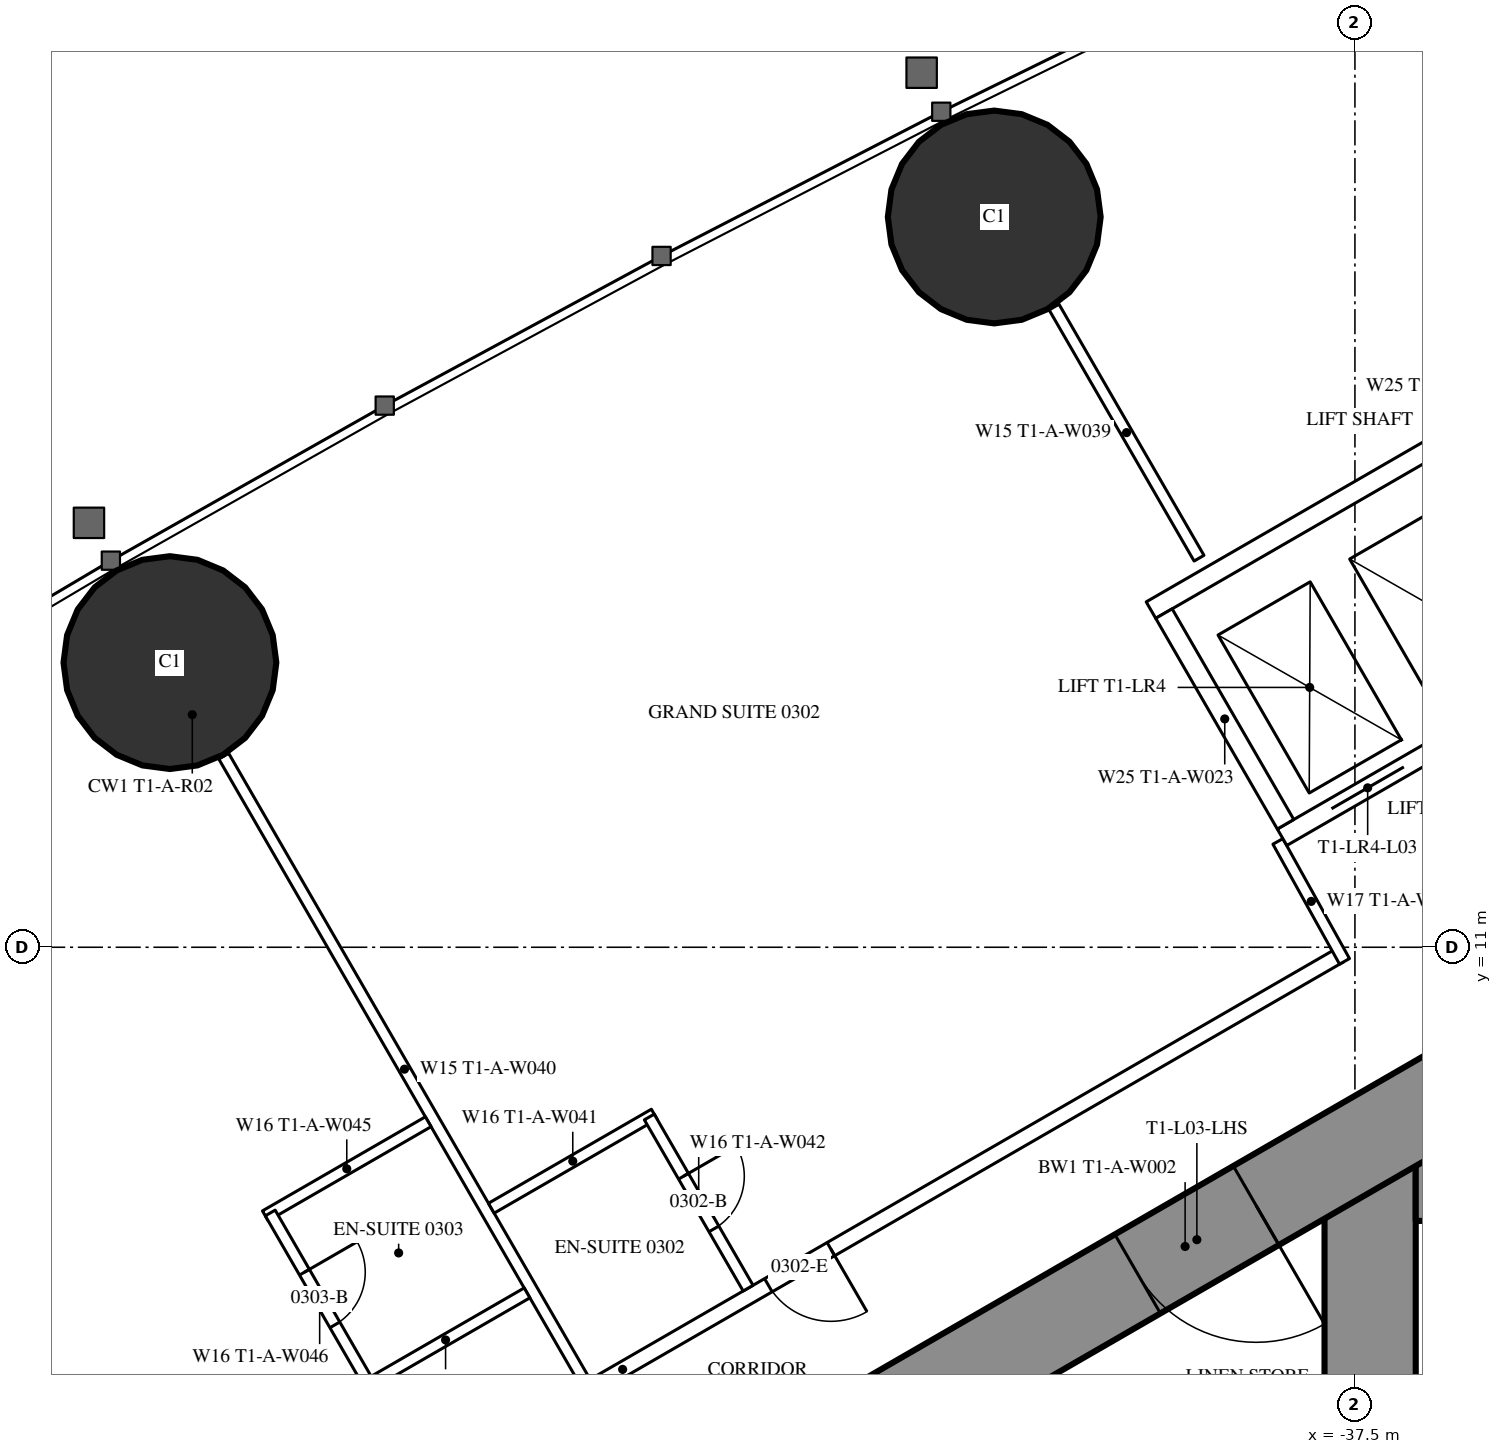
"""IFC4 building model, lengths in metres.
Left out: names, types, materials, properties, quantities, classifications, styles, units other than length and angle.
Written with IfcOpenShell. Run it as: python <this file> out.ifc"""

import sys

from ifc_helpers import new_model, si_unit, direction, frame, frame_2d, origin, origin_2d, place, context, subcontext, project, spatial, rectangle, hollow_circle, extrude, element, fill, save


model = new_model("IFC4")
c1 = context("Model", 3, precision=1e-05, world=origin(), true_north=direction((0.0, 1.0)))
c2 = subcontext(c1, "Body", "Model", "MODEL_VIEW")
j1 = project(units=[si_unit("LENGTHUNIT", "METRE"), si_unit("PLANEANGLEUNIT", "RADIAN")], contexts=[c1])
p1 = place(None, origin())
s1 = spatial("IfcSite", under=j1, at=p1, CompositionType="ELEMENT")
p2 = place(p1, origin())
s2 = spatial("IfcBuilding", under=s1, at=p2, CompositionType="ELEMENT")
p3 = place(p2, frame((0.0, 0.0, 18.0)))
s3 = spatial("IfcBuildingStorey", under=s2, at=p3, CompositionType="ELEMENT", Elevation=18.0)
for number, where, z_axis, x_axis in (
    (1, (-42.245, 20.607, 0.0), (0.0, 0.0, 1.0), (1.0, 0.0, 0.0)),
    (2, (-53.09, 14.745, 0.0), (0.0, 0.0, 1.0), (1.0, 0.0, 0.0)),
):
    element("IfcColumn", number, at=place(p3, frame(where, z_axis=z_axis, x_axis=x_axis)), inside=s3, PredefinedType="COLUMN", context=c2, shape_type="SweptSolid", body=[
        extrude(hollow_circle(Radius=1.4, WallThickness=0.12, at=origin_2d()), origin(), (0.0, 0.0, 1.0), 3.5),
    ])
p4 = place(p3, frame((-37.3, 8.6, 0.0), z_axis=(0.0, 0.0, 1.0), x_axis=(0.0, -1.0, 0.0)))
e3 = element("IfcWall", 3, at=p4, inside=s3, PredefinedType="SHEAR", context=c2, shape_type="SweptSolid", body=[
    extrude(rectangle(XDim=17.2, YDim=1.2, at=frame_2d((8.6, 0.0))), origin(), (0.0, 0.0, 1.0), 3.5),
])
p5 = place(p4, frame((7.7, 0.0, 0.0)))
e4 = element("IfcOpeningElement", 4, at=p5, cuts=e3, PredefinedType="OPENING", context=c2, shape_type="SweptSolid", body=[
    extrude(rectangle(XDim=1.8, YDim=2.2, at=frame_2d((0.9, 1.1))), frame((0.0, 0.61, 0.0), z_axis=(0.0, -1.0, 0.0), x_axis=(1.0, 0.0, 0.0)), (0.0, 0.0, 1.0), 1.22),
])
p6 = place(p3, frame((-28.3, 8.0, 0.0), z_axis=(0.0, 0.0, 1.0), x_axis=(-1.0, 0.0, 0.0)))
e5 = element("IfcWall", 5, at=p6, inside=s3, PredefinedType="SHEAR", context=c2, shape_type="SweptSolid", body=[
    extrude(rectangle(XDim=8.4, YDim=1.2, at=frame_2d((4.2, 0.0))), origin(), (0.0, 0.0, 1.0), 3.5),
])
p7 = place(p6, frame((0.25, 0.0, 0.0)))
e6 = element("IfcOpeningElement", 6, at=p7, cuts=e5, PredefinedType="OPENING", context=c2, shape_type="SweptSolid", body=[
    extrude(rectangle(XDim=1.0, YDim=2.2, at=frame_2d((0.5, 1.1))), frame((0.0, 0.61, 0.0), z_axis=(0.0, -1.0, 0.0), x_axis=(1.0, 0.0, 0.0)), (0.0, 0.0, 1.0), 1.22),
])
p8 = place(p3, frame((-27.2, 14.3, 0.0), z_axis=(0.0, 0.0, 1.0), x_axis=(-0.866026593062, -0.499997940104, 0.0)))
e7 = element("IfcWall", 7, at=p8, inside=s3, PredefinedType="SHEAR", context=c2, shape_type="SweptSolid", body=[
    extrude(rectangle(XDim=28.946, YDim=1.2, at=frame_2d((14.473, 0.0))), origin(), (0.0, 0.0, 1.0), 3.5),
])
p9 = place(p8, frame((4.6, 0.0, 0.0)))
e8 = element("IfcOpeningElement", 8, at=p9, cuts=e7, PredefinedType="OPENING", context=c2, shape_type="SweptSolid", body=[
    extrude(rectangle(XDim=1.0, YDim=2.2, at=frame_2d((0.5, 1.1))), frame((0.0, 0.61, 0.0), z_axis=(0.0, -1.0, 0.0), x_axis=(1.0, 0.0, 0.0)), (0.0, 0.0, 1.0), 1.22),
])
p10 = place(p8, frame((13.395, 0.0, 0.0)))
e9 = element("IfcOpeningElement", 9, at=p10, cuts=e7, PredefinedType="OPENING", context=c2, shape_type="SweptSolid", body=[
    extrude(rectangle(XDim=1.8, YDim=2.2, at=frame_2d((0.9, 1.1))), frame((0.0, 0.61, 0.0), z_axis=(0.0, -1.0, 0.0), x_axis=(1.0, 0.0, 0.0)), (0.0, 0.0, 1.0), 1.22),
])
p11 = place(p3, frame((-47.627, 5.278, 0.0), z_axis=(0.0, 0.0, 1.0), x_axis=(-0.500009844318, 0.86601972009, 0.0)))
e10 = element("IfcWall", 10, at=p11, inside=s3, PredefinedType="PARTITIONING", context=c2, shape_type="SweptSolid", body=[
    extrude(rectangle(XDim=9.51, YDim=0.15, at=frame_2d((4.755, 0.0))), origin(), (0.0, 0.0, 1.0), 2.25),
])
p12 = place(p3, frame((-39.551, 16.119, 0.0), z_axis=(0.0, 0.0, 1.0), x_axis=(-0.500014214979, 0.866017196607, 0.0)))
e11 = element("IfcWall", 11, at=p12, inside=s3, PredefinedType="PARTITIONING", context=c2, shape_type="SweptSolid", body=[
    extrude(rectangle(XDim=3.815, YDim=0.15, at=frame_2d((1.907, 0.0))), origin(), (0.0, 0.0, 1.0), 3.25),
])
p13 = place(p3, frame((-37.7, 10.894, 0.0), z_axis=(0.0, 0.0, 1.0), x_axis=(-0.866027905338, -0.499995667157, 0.0)))
e12 = element("IfcWall", 12, at=p13, inside=s3, PredefinedType="PARTITIONING", context=c2, shape_type="SweptSolid", body=[
    extrude(rectangle(XDim=21.787, YDim=0.2, at=frame_2d((10.894, 0.0))), origin(), (0.0, 0.0, 1.0), 3.25),
])
p14 = place(p13, frame((11.78, 0.0, 0.0)))
e13 = element("IfcOpeningElement", 13, at=p14, cuts=e12, PredefinedType="OPENING", context=c2, shape_type="SweptSolid", body=[
    extrude(rectangle(XDim=0.95, YDim=2.2, at=frame_2d((0.475, 1.1))), frame((0.0, 0.11, 0.0), z_axis=(0.0, -1.0, 0.0), x_axis=(1.0, 0.0, 0.0)), (0.0, 0.0, 1.0), 0.22),
])
p15 = place(p13, frame((7.73, 0.0, 0.0)))
e14 = element("IfcOpeningElement", 14, at=p15, cuts=e12, PredefinedType="OPENING", context=c2, shape_type="SweptSolid", body=[
    extrude(rectangle(XDim=0.95, YDim=2.2, at=frame_2d((0.475, 1.1))), frame((0.0, 0.11, 0.0), z_axis=(0.0, -1.0, 0.0), x_axis=(1.0, 0.0, 0.0)), (0.0, 0.0, 1.0), 0.22),
])
p16 = place(p3, frame((-38.513, 12.392, 0.0), z_axis=(0.0, 0.0, 1.0), x_axis=(0.485585508183, -0.874189175317, 0.0)))
e15 = element("IfcWall", 15, at=p16, inside=s3, PredefinedType="PARTITIONING", context=c2, shape_type="SweptSolid", body=[
    extrude(rectangle(XDim=1.805, YDim=0.15, at=frame_2d((0.902, 0.0))), origin(), (0.0, 0.0, 1.0), 3.25),
])
p17 = place(p3, frame((-49.692, 8.704, 0.0), z_axis=(0.0, 0.0, 1.0), x_axis=(-0.866073894602, -0.499916002032, 0.0)))
e16 = element("IfcWall", 16, at=p17, inside=s3, PredefinedType="PARTITIONING", context=c2, shape_type="SweptSolid", body=[
    extrude(rectangle(XDim=2.475, YDim=0.15, at=frame_2d((1.238, 0.0))), origin(), (0.0, 0.0, 1.0), 3.25),
])
p18 = place(p3, frame((-50.47, 5.253, 0.0), z_axis=(0.0, 0.0, 1.0), x_axis=(-0.500006934395, 0.866021400173, 0.0)))
e17 = element("IfcWall", 17, at=p18, inside=s3, PredefinedType="PARTITIONING", context=c2, shape_type="SweptSolid", body=[
    extrude(rectangle(XDim=2.6, YDim=0.15, at=frame_2d((1.3, 0.0))), origin(), (0.0, 0.0, 1.0), 3.25),
])
p19 = place(p18, frame((0.9, 0.0, 0.0)))
e18 = element("IfcOpeningElement", 18, at=p19, cuts=e17, PredefinedType="OPENING", context=c2, shape_type="SweptSolid", body=[
    extrude(rectangle(XDim=0.8, YDim=2.2, at=frame_2d((0.4, 1.1))), frame((0.0, 0.085, 0.0), z_axis=(0.0, -1.0, 0.0), x_axis=(1.0, 0.0, 0.0)), (0.0, 0.0, 1.0), 0.17),
])
for number, where, z_axis, x_axis in (
    (19, (-48.392, 6.453, 0.0), (0.0, 0.0, 1.0), (-0.866, -0.5, 0.0)),
    (20, (-46.719, 8.804, 0.0), (0.0, 0.0, 1.0), (-0.866, -0.5, 0.0)),
):
    element("IfcWall", number, at=place(p3, frame(where, z_axis=z_axis, x_axis=x_axis)), inside=s3, PredefinedType="PARTITIONING", context=c2, shape_type="SweptSolid", body=[
        extrude(rectangle(XDim=2.475, YDim=0.15, at=frame_2d((1.237, 0.0))), origin(), (0.0, 0.0, 1.0), 3.25),
    ])
p20 = place(p3, frame((-45.483, 6.515, 0.0), z_axis=(0.0, 0.0, 1.0), x_axis=(-0.500006934395, 0.866021400173, 0.0)))
e21 = element("IfcWall", 21, at=p20, inside=s3, PredefinedType="PARTITIONING", context=c2, shape_type="SweptSolid", body=[
    extrude(rectangle(XDim=2.6, YDim=0.15, at=frame_2d((1.3, 0.0))), origin(), (0.0, 0.0, 1.0), 3.25),
])
p21 = place(p20, frame((0.9, 0.0, 0.0)))
e22 = element("IfcOpeningElement", 22, at=p21, cuts=e21, PredefinedType="OPENING", context=c2, shape_type="SweptSolid", body=[
    extrude(rectangle(XDim=0.8, YDim=2.2, at=frame_2d((0.4, 1.1))), frame((0.0, 0.085, 0.0), z_axis=(0.0, -1.0, 0.0), x_axis=(1.0, 0.0, 0.0)), (0.0, 0.0, 1.0), 0.17),
])
p22 = place(p3, frame((-31.01, 16.747, 0.0), z_axis=(0.0, 0.0, 1.0), x_axis=(-0.866028165386, -0.499995216735, 0.0)))
e23 = element("IfcWall", 23, at=p22, inside=s3, PredefinedType="PARTITIONING", context=c2, shape_type="SweptSolid", body=[
    extrude(rectangle(XDim=8.6, YDim=0.25, at=frame_2d((4.3, 0.0))), origin(), (0.0, 0.0, 1.0), 3.25),
])
p23 = place(p22, frame((0.75, 0.0, 0.0)))
e24 = element("IfcOpeningElement", 24, at=p23, cuts=e23, PredefinedType="OPENING", context=c2, shape_type="SweptSolid", body=[
    extrude(rectangle(XDim=1.1, YDim=2.2, at=frame_2d((0.55, 1.1))), frame((0.0, 0.135, 0.0), z_axis=(0.0, -1.0, 0.0), x_axis=(1.0, 0.0, 0.0)), (0.0, 0.0, 1.0), 0.27),
])
p24 = place(p22, frame((2.75, 0.0, 0.0)))
e25 = element("IfcOpeningElement", 25, at=p24, cuts=e23, PredefinedType="OPENING", context=c2, shape_type="SweptSolid", body=[
    extrude(rectangle(XDim=1.1, YDim=2.2, at=frame_2d((0.55, 1.1))), frame((0.0, 0.135, 0.0), z_axis=(0.0, -1.0, 0.0), x_axis=(1.0, 0.0, 0.0)), (0.0, 0.0, 1.0), 0.27),
])
p25 = place(p22, frame((4.75, 0.0, 0.0)))
e26 = element("IfcOpeningElement", 26, at=p25, cuts=e23, PredefinedType="OPENING", context=c2, shape_type="SweptSolid", body=[
    extrude(rectangle(XDim=1.1, YDim=2.2, at=frame_2d((0.55, 1.1))), frame((0.0, 0.135, 0.0), z_axis=(0.0, -1.0, 0.0), x_axis=(1.0, 0.0, 0.0)), (0.0, 0.0, 1.0), 0.27),
])
p26 = place(p22, frame((6.75, 0.0, 0.0)))
e27 = element("IfcOpeningElement", 27, at=p26, cuts=e23, PredefinedType="OPENING", context=c2, shape_type="SweptSolid", body=[
    extrude(rectangle(XDim=1.1, YDim=2.2, at=frame_2d((0.55, 1.1))), frame((0.0, 0.135, 0.0), z_axis=(0.0, -1.0, 0.0), x_axis=(1.0, 0.0, 0.0)), (0.0, 0.0, 1.0), 0.27),
])
p27 = place(p3, frame((-32.736, 19.736, 0.0), z_axis=(0.0, 0.0, 1.0), x_axis=(-0.866028165386, -0.499995216735, 0.0)))
e28 = element("IfcWall", 28, at=p27, inside=s3, PredefinedType="PARTITIONING", context=c2, shape_type="SweptSolid", body=[
    extrude(rectangle(XDim=8.6, YDim=0.25, at=frame_2d((4.3, 0.0))), origin(), (0.0, 0.0, 1.0), 3.25),
])
p28 = place(p3, frame((-38.413, 12.618, 0.0), z_axis=(0.0, 0.0, 1.0), x_axis=(-0.499872130319, 0.866099216793, 0.0)))
e29 = element("IfcWall", 29, at=p28, inside=s3, PredefinedType="PARTITIONING", context=c2, shape_type="SweptSolid", body=[
    extrude(rectangle(XDim=3.2, YDim=0.25, at=frame_2d((1.6, 0.0))), origin(), (0.0, 0.0, 1.0), 3.25),
])
p29 = place(p19, origin())
e30 = element("IfcDoor", 30, at=p29, inside=s3, OperationType="SINGLE_SWING_RIGHT", PredefinedType="DOOR", context=c2, shape_type="SweptSolid", body=[
    extrude(rectangle(XDim=0.8, YDim=2.2, at=frame_2d((0.4, 1.1))), frame((0.0, 0.025, 0.0), z_axis=(0.0, -1.0, 0.0), x_axis=(1.0, 0.0, 0.0)), (0.0, 0.0, 1.0), 0.05),
])
fill(e18, e30)
p30 = place(p21, origin())
e31 = element("IfcDoor", 31, at=p30, inside=s3, OperationType="SINGLE_SWING_RIGHT", PredefinedType="DOOR", context=c2, shape_type="SweptSolid", body=[
    extrude(rectangle(XDim=0.8, YDim=2.2, at=frame_2d((0.4, 1.1))), frame((0.0, 0.025, 0.0), z_axis=(0.0, -1.0, 0.0), x_axis=(1.0, 0.0, 0.0)), (0.0, 0.0, 1.0), 0.05),
])
fill(e22, e31)
p31 = place(p15, origin())
e32 = element("IfcDoor", 32, at=p31, inside=s3, OperationType="SINGLE_SWING_LEFT", PredefinedType="DOOR", context=c2, shape_type="SweptSolid", body=[
    extrude(rectangle(XDim=0.95, YDim=2.2, at=frame_2d((0.475, 1.1))), frame((0.0, 0.025, 0.0), z_axis=(0.0, -1.0, 0.0), x_axis=(1.0, 0.0, 0.0)), (0.0, 0.0, 1.0), 0.05),
])
fill(e14, e32)
p32 = place(p10, origin())
e33 = element("IfcDoor", 33, at=p32, inside=s3, OperationType="DOUBLE_DOOR_SINGLE_SWING", PredefinedType="DOOR", context=c2, shape_type="SweptSolid", body=[
    extrude(rectangle(XDim=1.8, YDim=2.2, at=frame_2d((0.9, 1.1))), frame((0.0, 0.025, 0.0), z_axis=(0.0, -1.0, 0.0), x_axis=(1.0, 0.0, 0.0)), (0.0, 0.0, 1.0), 0.05),
])
fill(e9, e33)
p33 = place(p26, origin())
e34 = element("IfcDoor", 34, at=p33, inside=s3, OperationType="DOUBLE_DOOR_SLIDING", PredefinedType="USERDEFINED", context=c2, shape_type="SweptSolid", body=[
    extrude(rectangle(XDim=1.1, YDim=2.2, at=frame_2d((0.55, 1.1))), frame((0.0, 0.025, 0.0), z_axis=(0.0, -1.0, 0.0), x_axis=(1.0, 0.0, 0.0)), (0.0, 0.0, 1.0), 0.05),
])
fill(e27, e34)
save(model, sys.argv[1])
